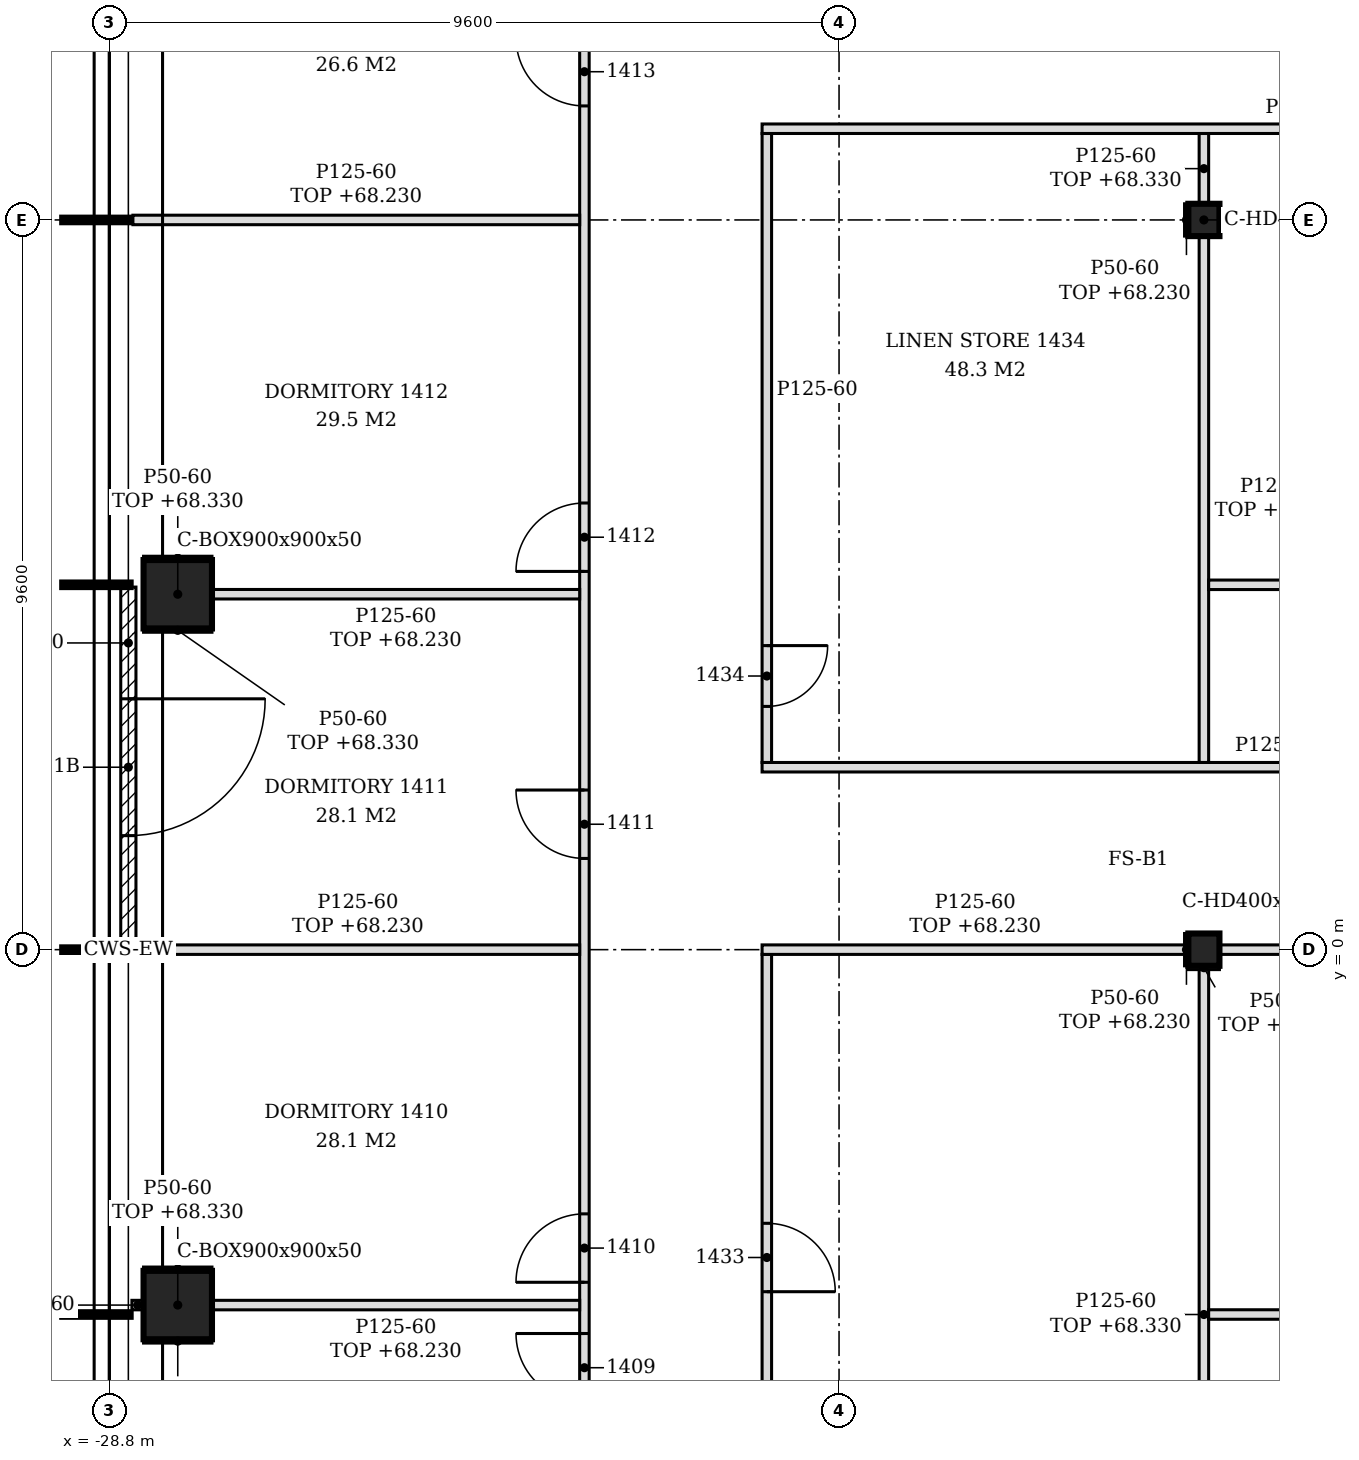
"""IFC4 building model, lengths in metres.
Left out: names, types, materials, properties, quantities, classifications, styles, units other than length and angle.
Written with IfcOpenShell. Run it as: python <this file> out.ifc"""

import sys

from ifc_helpers import new_model, si_unit, direction, frame, frame_2d, origin, origin_2d, place, context, subcontext, project, spatial, polyline, rectangle, hollow_rectangle, i_section, outline, extrude, element, fill, save


model = new_model("IFC4")
c1 = context("Model", 3, precision=1e-05, world=origin(), true_north=direction((0.0, 1.0)))
c2 = subcontext(c1, "Body", "Model", "MODEL_VIEW")
j1 = project(units=[si_unit("LENGTHUNIT", "METRE"), si_unit("PLANEANGLEUNIT", "RADIAN")], contexts=[c1])
p1 = place(None, origin())
s1 = spatial("IfcSite", under=j1, at=p1, CompositionType="ELEMENT")
p2 = place(p1, origin())
s2 = spatial("IfcBuilding", under=s1, at=p2, CompositionType="ELEMENT")
p3 = place(p2, frame((0.0, 0.0, 65.4)))
s3 = spatial("IfcBuildingStorey", under=s2, at=p3, CompositionType="ELEMENT", Elevation=65.4)
for number, where, z_axis, x_axis in (
    (1, (-27.9, 4.676, -0.15), (0.0, 0.0, 1.0), (1.0, 0.0, 0.0)),
    (2, (-27.9, -4.676, -0.15), (0.0, 0.0, 1.0), (1.0, 0.0, 0.0)),
):
    element("IfcColumn", number, at=place(p3, frame(where, z_axis=z_axis, x_axis=x_axis)), inside=s3, PredefinedType="COLUMN", context=c2, shape_type="SweptSolid", body=[
        extrude(hollow_rectangle(XDim=0.9, YDim=0.9, WallThickness=0.05, at=origin_2d()), origin(), (0.0, 0.0, 1.0), 3.6),
    ])
for number, where, z_axis, x_axis in (
    (3, (-14.4, 0.0, -0.15), (0.0, 0.0, 1.0), (1.0, 0.0, 0.0)),
    (4, (-14.4, 9.6, -0.15), (0.0, 0.0, 1.0), (1.0, 0.0, 0.0)),
):
    element("IfcColumn", number, at=place(p3, frame(where, z_axis=z_axis, x_axis=x_axis)), inside=s3, PredefinedType="COLUMN", context=c2, shape_type="SweptSolid", body=[
        extrude(i_section(OverallWidth=0.409, OverallDepth=0.425, WebThickness=0.033, FlangeThickness=0.052, FilletRadius=0.015, at=origin_2d()), origin(), (0.0, 0.0, 1.0), 3.6),
    ])
p4 = place(p3, frame((-28.55, 4.77, 0.0), z_axis=(0.0, 0.0, 1.0), x_axis=(0.0, -1.0, 0.0)))
e5 = element("IfcWall", 5, at=p4, inside=s3, PredefinedType="NOTDEFINED", context=c2, shape_type="SweptSolid", body=[
    extrude(rectangle(XDim=4.74, YDim=0.2, at=frame_2d((2.37, 0.0))), origin(), (0.0, 0.0, 1.0), 3.45),
])
p5 = place(p4, frame((1.47, 0.0, 0.0)))
e6 = element("IfcOpeningElement", 6, at=p5, cuts=e5, PredefinedType="OPENING", context=c2, shape_type="SweptSolid", body=[
    extrude(rectangle(XDim=1.8, YDim=2.4, at=frame_2d((0.9, 1.2))), frame((0.0, 0.11, 0.0), z_axis=(0.0, -1.0, 0.0), x_axis=(1.0, 0.0, 0.0)), (0.0, 0.0, 1.0), 0.22),
])
p6 = place(p3, frame((-22.55, -16.087, 0.0), z_axis=(0.0, 0.0, 1.0), x_axis=(0.0, 1.0, 0.0)))
e7 = element("IfcWall", 7, at=p6, inside=s3, PredefinedType="PARTITIONING", context=c2, shape_type="SweptSolid", body=[
    extrude(outline(polyline([(0.0, 0.0), (36.276, 0.0), (36.276, 3.45), (36.022, 3.45), (36.02, 2.63), (34.907, 2.63), (34.905, 3.45), (30.597, 3.45), (30.595, 2.83), (30.377, 2.83), (30.375, 3.45), (25.798, 3.45), (25.795, 2.83), (25.577, 2.83), (25.575, 3.45), (20.998, 3.45), (20.996, 2.83), (20.778, 2.83), (20.775, 3.45), (16.198, 3.45), (16.196, 2.83), (15.978, 2.83), (15.976, 3.45), (11.397, 3.45), (11.396, 2.83), (11.177, 2.83), (11.176, 3.45), (6.597, 3.45), (6.595, 2.83), (6.377, 2.83), (6.375, 3.45), (1.798, 3.45), (1.795, 2.83), (1.577, 2.83), (1.575, 3.45), (0.0, 3.45), (0.0, 0.0)])), frame((0.0, 0.062, 0.0), z_axis=(0.0, -1.0, 0.0), x_axis=(1.0, 0.0, 0.0)), (0.0, 0.0, 1.0), 0.125),
])
p7 = place(p6, frame((10.137, 0.0, 0.0)))
e8 = element("IfcOpeningElement", 8, at=p7, cuts=e7, PredefinedType="OPENING", context=c2, shape_type="SweptSolid", body=[
    extrude(rectangle(XDim=0.9, YDim=2.1, at=frame_2d((0.45, 1.05))), frame((0.0, 0.073, 0.0), z_axis=(0.0, -1.0, 0.0), x_axis=(1.0, 0.0, 0.0)), (0.0, 0.0, 1.0), 0.145),
])
p8 = place(p6, frame((11.711, 0.0, 0.0)))
e9 = element("IfcOpeningElement", 9, at=p8, cuts=e7, PredefinedType="OPENING", context=c2, shape_type="SweptSolid", body=[
    extrude(rectangle(XDim=0.9, YDim=2.1, at=frame_2d((0.45, 1.05))), frame((0.0, 0.073, 0.0), z_axis=(0.0, -1.0, 0.0), x_axis=(1.0, 0.0, 0.0)), (0.0, 0.0, 1.0), 0.145),
])
p9 = place(p6, frame((17.288, 0.0, 0.0)))
e10 = element("IfcOpeningElement", 10, at=p9, cuts=e7, PredefinedType="OPENING", context=c2, shape_type="SweptSolid", body=[
    extrude(rectangle(XDim=0.9, YDim=2.1, at=frame_2d((0.45, 1.05))), frame((0.0, 0.073, 0.0), z_axis=(0.0, -1.0, 0.0), x_axis=(1.0, 0.0, 0.0)), (0.0, 0.0, 1.0), 0.145),
])
p10 = place(p6, frame((21.063, 0.0, 0.0)))
e11 = element("IfcOpeningElement", 11, at=p10, cuts=e7, PredefinedType="OPENING", context=c2, shape_type="SweptSolid", body=[
    extrude(rectangle(XDim=0.9, YDim=2.1, at=frame_2d((0.45, 1.05))), frame((0.0, 0.073, 0.0), z_axis=(0.0, -1.0, 0.0), x_axis=(1.0, 0.0, 0.0)), (0.0, 0.0, 1.0), 0.145),
])
p11 = place(p6, frame((27.188, 0.0, 0.0)))
e12 = element("IfcOpeningElement", 12, at=p11, cuts=e7, PredefinedType="OPENING", context=c2, shape_type="SweptSolid", body=[
    extrude(rectangle(XDim=0.9, YDim=2.1, at=frame_2d((0.45, 1.05))), frame((0.0, 0.073, 0.0), z_axis=(0.0, -1.0, 0.0), x_axis=(1.0, 0.0, 0.0)), (0.0, 0.0, 1.0), 0.145),
])
p12 = place(p6, frame((30.415, 0.0, 0.0)))
e13 = element("IfcOpeningElement", 13, at=p12, cuts=e7, PredefinedType="OPENING", context=c2, shape_type="SweptSolid", body=[
    extrude(rectangle(XDim=0.9, YDim=2.1, at=frame_2d((0.45, 1.05))), frame((0.0, 0.073, 0.0), z_axis=(0.0, -1.0, 0.0), x_axis=(1.0, 0.0, 0.0)), (0.0, 0.0, 1.0), 0.145),
])
p13 = place(p3, frame((-20.15, -13.688, 0.0), z_axis=(0.0, 0.0, 1.0), x_axis=(0.0, 1.0, 0.0)))
e14 = element("IfcWall", 14, at=p13, inside=s3, PredefinedType="PARTITIONING", context=c2, shape_type="SweptSolid", body=[
    extrude(outline(polyline([(0.0, 0.0), (13.625, 0.0), (13.625, 2.83), (13.577, 2.83), (13.575, 3.45), (8.998, 3.45), (8.996, 2.83), (8.778, 2.83), (8.775, 3.45), (4.198, 3.45), (4.196, 2.83), (3.978, 2.83), (3.976, 3.45), (0.0, 3.45), (0.0, 0.0)])), frame((0.0, 0.062, 0.0), z_axis=(0.0, -1.0, 0.0), x_axis=(1.0, 0.0, 0.0)), (0.0, 0.0, 1.0), 0.125),
])
p14 = place(p13, frame((9.188, 0.0, 0.0)))
e15 = element("IfcOpeningElement", 15, at=p14, cuts=e14, PredefinedType="OPENING", context=c2, shape_type="SweptSolid", body=[
    extrude(rectangle(XDim=0.9, YDim=2.1, at=frame_2d((0.45, 1.05))), frame((0.0, 0.073, 0.0), z_axis=(0.0, -1.0, 0.0), x_axis=(1.0, 0.0, 0.0)), (0.0, 0.0, 1.0), 0.145),
])
p15 = place(p3, frame((-14.4, -9.387, 0.0), z_axis=(0.0, 0.0, 1.0), x_axis=(0.0, 1.0, 0.0)))
e16 = element("IfcWall", 16, at=p15, inside=s3, PredefinedType="PARTITIONING", context=c2, shape_type="SweptSolid", body=[
    extrude(rectangle(XDim=9.175, YDim=0.125, at=frame_2d((4.587, 0.0))), origin(), (0.0, 0.0, 1.0), 2.93),
])
p16 = place(p3, frame((-14.337, -4.8, 0.0), z_axis=(0.0, 0.0, 1.0), x_axis=(1.0, 0.0, 0.0)))
e17 = element("IfcWall", 17, at=p16, inside=s3, PredefinedType="PARTITIONING", context=c2, shape_type="SweptSolid", body=[
    extrude(outline(polyline([(0.0, 0.0), (9.475, 0.0), (9.475, 2.83), (9.387, 2.83), (9.385, 2.93), (0.0, 2.93), (0.0, 0.0)])), frame((0.0, 0.062, 0.0), z_axis=(0.0, -1.0, 0.0), x_axis=(1.0, 0.0, 0.0)), (0.0, 0.0, 1.0), 0.125),
])
p17 = place(p3, frame((-28.503, -4.676, 0.0), z_axis=(0.0, 0.0, 1.0), x_axis=(1.0, 0.0, 0.0)))
e18 = element("IfcWall", 18, at=p17, inside=s3, PredefinedType="PARTITIONING", context=c2, shape_type="SweptSolid", body=[
    extrude(rectangle(XDim=0.153, YDim=0.125, at=frame_2d((0.076, 0.0))), origin(), (0.0, 0.0, 1.0), 3.45),
])
p18 = place(p3, frame((-27.45, -4.676, 0.0), z_axis=(0.0, 0.0, 1.0), x_axis=(1.0, 0.0, 0.0)))
e19 = element("IfcWall", 19, at=p18, inside=s3, PredefinedType="PARTITIONING", context=c2, shape_type="SweptSolid", body=[
    extrude(rectangle(XDim=4.837, YDim=0.125, at=frame_2d((2.419, 0.0))), origin(), (0.0, 0.0, 1.0), 2.83),
])
p19 = place(p3, frame((-28.45, 0.0, 0.0), z_axis=(0.0, 0.0, 1.0), x_axis=(1.0, 0.0, 0.0)))
e20 = element("IfcWall", 20, at=p19, inside=s3, PredefinedType="PARTITIONING", context=c2, shape_type="SweptSolid", body=[
    extrude(rectangle(XDim=5.837, YDim=0.125, at=frame_2d((2.919, 0.0))), origin(), (0.0, 0.0, 1.0), 2.83),
])
p20 = place(p3, frame((-20.212, 0.0, 0.0), z_axis=(0.0, 0.0, 1.0), x_axis=(1.0, 0.0, 0.0)))
e21 = element("IfcWall", 21, at=p20, inside=s3, PredefinedType="PARTITIONING", context=c2, shape_type="SweptSolid", body=[
    extrude(rectangle(XDim=5.608, YDim=0.125, at=frame_2d((2.804, 0.0))), origin(), (0.0, 0.0, 1.0), 2.83),
])
p21 = place(p3, frame((-14.196, 0.0, 0.0), z_axis=(0.0, 0.0, 1.0), x_axis=(1.0, 0.0, 0.0)))
e22 = element("IfcWall", 22, at=p21, inside=s3, PredefinedType="PARTITIONING", context=c2, shape_type="SweptSolid", body=[
    extrude(outline(polyline([(0.0, 0.0), (9.458, 0.0), (9.458, 2.83), (9.246, 2.83), (9.243, 2.93), (0.0, 2.93), (0.0, 0.0)])), frame((0.0, 0.062, 0.0), z_axis=(0.0, -1.0, 0.0), x_axis=(1.0, 0.0, 0.0)), (0.0, 0.0, 1.0), 0.125),
])
p22 = place(p21, frame((8.196, 0.0, 0.0)))
e23 = element("IfcOpeningElement", 23, at=p22, cuts=e22, PredefinedType="OPENING", context=c2, shape_type="SweptSolid", body=[
    extrude(rectangle(XDim=0.9, YDim=2.1, at=frame_2d((0.45, 1.05))), frame((0.0, 0.073, 0.0), z_axis=(0.0, -1.0, 0.0), x_axis=(1.0, 0.0, 0.0)), (0.0, 0.0, 1.0), 0.145),
])
p23 = place(p3, frame((-20.212, 2.4, 0.0), z_axis=(0.0, 0.0, 1.0), x_axis=(1.0, 0.0, 0.0)))
e24 = element("IfcWall", 24, at=p23, inside=s3, PredefinedType="PARTITIONING", context=c2, shape_type="SweptSolid", body=[
    extrude(outline(polyline([(0.0, 0.0), (15.2, 0.0), (15.2, 3.45), (5.962, 3.45), (5.96, 2.93), (5.663, 2.93), (5.66, 3.45), (0.0, 3.45), (0.0, 0.0)])), frame((0.0, 0.062, 0.0), z_axis=(0.0, -1.0, 0.0), x_axis=(1.0, 0.0, 0.0)), (0.0, 0.0, 1.0), 0.125),
])
p24 = place(p23, frame((13.512, 0.0, 0.0)))
e25 = element("IfcOpeningElement", 25, at=p24, cuts=e24, PredefinedType="OPENING", context=c2, shape_type="SweptSolid", body=[
    extrude(rectangle(XDim=0.9, YDim=2.1, at=frame_2d((0.45, 1.05))), frame((0.0, 0.073, 0.0), z_axis=(0.0, -1.0, 0.0), x_axis=(1.0, 0.0, 0.0)), (0.0, 0.0, 1.0), 0.145),
])
p25 = place(p3, frame((-20.15, 2.462, 0.0), z_axis=(0.0, 0.0, 1.0), x_axis=(0.0, 1.0, 0.0)))
e26 = element("IfcWall", 26, at=p25, inside=s3, PredefinedType="PARTITIONING", context=c2, shape_type="SweptSolid", body=[
    extrude(outline(polyline([(0.0, 0.0), (8.275, 0.0), (8.275, 3.45), (7.248, 3.45), (7.246, 2.83), (7.028, 2.83), (7.025, 3.45), (2.448, 3.45), (2.446, 2.83), (2.228, 2.83), (2.226, 3.45), (0.0, 3.45), (0.0, 0.0)])), frame((0.0, 0.062, 0.0), z_axis=(0.0, -1.0, 0.0), x_axis=(1.0, 0.0, 0.0)), (0.0, 0.0, 1.0), 0.125),
])
p26 = place(p25, frame((0.738, 0.0, 0.0)))
e27 = element("IfcOpeningElement", 27, at=p26, cuts=e26, PredefinedType="OPENING", context=c2, shape_type="SweptSolid", body=[
    extrude(rectangle(XDim=0.8, YDim=2.1, at=frame_2d((0.4, 1.05))), frame((0.0, 0.073, 0.0), z_axis=(0.0, -1.0, 0.0), x_axis=(1.0, 0.0, 0.0)), (0.0, 0.0, 1.0), 0.145),
])
p27 = place(p3, frame((-14.4, 2.462, 0.0), z_axis=(0.0, 0.0, 1.0), x_axis=(0.0, 1.0, 0.0)))
e28 = element("IfcWall", 28, at=p27, inside=s3, PredefinedType="PARTITIONING", context=c2, shape_type="SweptSolid", body=[
    extrude(rectangle(XDim=6.925, YDim=0.125, at=frame_2d((3.462, 0.0))), origin(), (0.0, 0.0, 1.0), 2.93),
])
p28 = place(p3, frame((-27.45, 4.676, 0.0), z_axis=(0.0, 0.0, 1.0), x_axis=(1.0, 0.0, 0.0)))
e29 = element("IfcWall", 29, at=p28, inside=s3, PredefinedType="PARTITIONING", context=c2, shape_type="SweptSolid", body=[
    extrude(rectangle(XDim=4.837, YDim=0.125, at=frame_2d((2.419, 0.0))), origin(), (0.0, 0.0, 1.0), 2.83),
])
p29 = place(p3, frame((-14.337, 4.8, 0.0), z_axis=(0.0, 0.0, 1.0), x_axis=(1.0, 0.0, 0.0)))
e30 = element("IfcWall", 30, at=p29, inside=s3, PredefinedType="PARTITIONING", context=c2, shape_type="SweptSolid", body=[
    extrude(outline(polyline([(0.0, 0.0), (9.475, 0.0), (9.475, 2.83), (9.387, 2.83), (9.385, 2.93), (0.0, 2.93), (0.0, 0.0)])), frame((0.0, 0.062, 0.0), z_axis=(0.0, -1.0, 0.0), x_axis=(1.0, 0.0, 0.0)), (0.0, 0.0, 1.0), 0.125),
])
p30 = place(p3, frame((-28.49, 9.6, 0.0), z_axis=(0.0, 0.0, 1.0), x_axis=(1.0, 0.0, 0.0)))
e31 = element("IfcWall", 31, at=p30, inside=s3, PredefinedType="PARTITIONING", context=c2, shape_type="SweptSolid", body=[
    extrude(rectangle(XDim=5.877, YDim=0.125, at=frame_2d((2.939, 0.0))), origin(), (0.0, 0.0, 1.0), 2.83),
])
p31 = place(p3, frame((-14.4, 9.812, 0.0), z_axis=(0.0, 0.0, 1.0), x_axis=(0.0, 1.0, 0.0)))
e32 = element("IfcWall", 32, at=p31, inside=s3, PredefinedType="PARTITIONING", context=c2, shape_type="SweptSolid", body=[
    extrude(rectangle(XDim=0.925, YDim=0.125, at=frame_2d((0.462, 0.0))), origin(), (0.0, 0.0, 1.0), 2.93),
])
p32 = place(p3, frame((-20.212, 10.8, 0.0), z_axis=(0.0, 0.0, 1.0), x_axis=(1.0, 0.0, 0.0)))
e33 = element("IfcWall", 33, at=p32, inside=s3, PredefinedType="PARTITIONING", context=c2, shape_type="SweptSolid", body=[
    extrude(outline(polyline([(0.0, 0.0), (15.475, 0.0), (15.475, 2.83), (15.262, 2.83), (15.26, 3.45), (5.962, 3.45), (5.96, 2.93), (5.663, 2.93), (5.66, 3.45), (0.0, 3.45), (0.0, 0.0)])), frame((0.0, 0.062, 0.0), z_axis=(0.0, -1.0, 0.0), x_axis=(1.0, 0.0, 0.0)), (0.0, 0.0, 1.0), 0.125),
])
p33 = place(p32, frame((14.312, 0.0, 0.0)))
e34 = element("IfcOpeningElement", 34, at=p33, cuts=e33, PredefinedType="OPENING", context=c2, shape_type="SweptSolid", body=[
    extrude(rectangle(XDim=0.8, YDim=2.1, at=frame_2d((0.4, 1.05))), frame((0.0, 0.073, 0.0), z_axis=(0.0, -1.0, 0.0), x_axis=(1.0, 0.0, 0.0)), (0.0, 0.0, 1.0), 0.145),
])
p34 = place(p3, frame((-14.629, -0.212, 0.0), z_axis=(0.0, 0.0, 1.0), x_axis=(0.0, 1.0, 0.0)))
e35 = element("IfcWall", 35, at=p34, inside=s3, PredefinedType="PARTITIONING", context=c2, shape_type="SweptSolid", body=[
    extrude(rectangle(XDim=0.425, YDim=0.05, at=frame_2d((0.212, 0.0))), origin(), (0.0, 0.0, 1.0), 2.83),
])
for number, where, z_axis, x_axis in (
    (36, (-28.35, -4.201, 0.0), (0.0, 0.0, 1.0), (1.0, 0.0, 0.0)),
    (37, (-28.35, -5.151, 0.0), (0.0, 0.0, 1.0), (1.0, 0.0, 0.0)),
):
    element("IfcWall", number, at=place(p3, frame(where, z_axis=z_axis, x_axis=x_axis)), inside=s3, PredefinedType="PARTITIONING", context=c2, shape_type="SweptSolid", body=[
        extrude(rectangle(XDim=0.9, YDim=0.05, at=frame_2d((0.45, 0.0))), origin(), (0.0, 0.0, 1.0), 2.93),
    ])
p35 = place(p3, frame((-14.604, -0.238, 0.0), z_axis=(0.0, 0.0, 1.0), x_axis=(1.0, 0.0, 0.0)))
e38 = element("IfcWall", 38, at=p35, inside=s3, PredefinedType="PARTITIONING", context=c2, shape_type="SweptSolid", body=[
    extrude(rectangle(XDim=0.409, YDim=0.05, at=frame_2d((0.205, 0.0))), origin(), (0.0, 0.0, 1.0), 2.93),
])
p36 = place(p3, frame((-14.629, 9.387, 0.0), z_axis=(0.0, 0.0, 1.0), x_axis=(0.0, 1.0, 0.0)))
e39 = element("IfcWall", 39, at=p36, inside=s3, PredefinedType="PARTITIONING", context=c2, shape_type="SweptSolid", body=[
    extrude(rectangle(XDim=0.425, YDim=0.05, at=frame_2d((0.212, 0.0))), origin(), (0.0, 0.0, 1.0), 2.83),
])
for number, where, z_axis, x_axis in (
    (40, (-28.35, 5.151, 0.0), (0.0, 0.0, 1.0), (1.0, 0.0, 0.0)),
    (41, (-28.35, 4.201, 0.0), (0.0, 0.0, 1.0), (1.0, 0.0, 0.0)),
):
    element("IfcWall", number, at=place(p3, frame(where, z_axis=z_axis, x_axis=x_axis)), inside=s3, PredefinedType="PARTITIONING", context=c2, shape_type="SweptSolid", body=[
        extrude(rectangle(XDim=0.9, YDim=0.05, at=frame_2d((0.45, 0.0))), origin(), (0.0, 0.0, 1.0), 2.93),
    ])
p37 = place(p5, origin())
e42 = element("IfcDoor", 42, at=p37, inside=s3, OperationType="SINGLE_SWING_LEFT", PredefinedType="DOOR", context=c2, shape_type="SweptSolid", body=[
    extrude(rectangle(XDim=1.8, YDim=2.4, at=frame_2d((0.9, 1.2))), frame((0.0, 0.025, 0.0), z_axis=(0.0, -1.0, 0.0), x_axis=(1.0, 0.0, 0.0)), (0.0, 0.0, 1.0), 0.05),
])
fill(e6, e42)
p38 = place(p7, origin())
e43 = element("IfcDoor", 43, at=p38, inside=s3, OperationType="SINGLE_SWING_RIGHT", PredefinedType="DOOR", context=c2, shape_type="SweptSolid", body=[
    extrude(rectangle(XDim=0.9, YDim=2.1, at=frame_2d((0.45, 1.05))), frame((0.0, 0.025, 0.0), z_axis=(0.0, -1.0, 0.0), x_axis=(1.0, 0.0, 0.0)), (0.0, 0.0, 1.0), 0.05),
])
fill(e8, e43)
p39 = place(p8, origin())
e44 = element("IfcDoor", 44, at=p39, inside=s3, OperationType="SINGLE_SWING_LEFT", PredefinedType="DOOR", context=c2, shape_type="SweptSolid", body=[
    extrude(rectangle(XDim=0.9, YDim=2.1, at=frame_2d((0.45, 1.05))), frame((0.0, 0.025, 0.0), z_axis=(0.0, -1.0, 0.0), x_axis=(1.0, 0.0, 0.0)), (0.0, 0.0, 1.0), 0.05),
])
fill(e9, e44)
p40 = place(p9, origin())
e45 = element("IfcDoor", 45, at=p40, inside=s3, OperationType="SINGLE_SWING_RIGHT", PredefinedType="DOOR", context=c2, shape_type="SweptSolid", body=[
    extrude(rectangle(XDim=0.9, YDim=2.1, at=frame_2d((0.45, 1.05))), frame((0.0, 0.025, 0.0), z_axis=(0.0, -1.0, 0.0), x_axis=(1.0, 0.0, 0.0)), (0.0, 0.0, 1.0), 0.05),
])
fill(e10, e45)
p41 = place(p10, origin())
e46 = element("IfcDoor", 46, at=p41, inside=s3, OperationType="SINGLE_SWING_LEFT", PredefinedType="DOOR", context=c2, shape_type="SweptSolid", body=[
    extrude(rectangle(XDim=0.9, YDim=2.1, at=frame_2d((0.45, 1.05))), frame((0.0, 0.025, 0.0), z_axis=(0.0, -1.0, 0.0), x_axis=(1.0, 0.0, 0.0)), (0.0, 0.0, 1.0), 0.05),
])
fill(e11, e46)
p42 = place(p11, origin())
e47 = element("IfcDoor", 47, at=p42, inside=s3, OperationType="SINGLE_SWING_RIGHT", PredefinedType="DOOR", context=c2, shape_type="SweptSolid", body=[
    extrude(rectangle(XDim=0.9, YDim=2.1, at=frame_2d((0.45, 1.05))), frame((0.0, 0.025, 0.0), z_axis=(0.0, -1.0, 0.0), x_axis=(1.0, 0.0, 0.0)), (0.0, 0.0, 1.0), 0.05),
])
fill(e12, e47)
p43 = place(p14, frame((0.9, 0.0, 0.0), z_axis=(0.0, 0.0, 1.0), x_axis=(-1.0, 0.0, 0.0)))
e48 = element("IfcDoor", 48, at=p43, inside=s3, OperationType="SINGLE_SWING_RIGHT", PredefinedType="DOOR", context=c2, shape_type="SweptSolid", body=[
    extrude(rectangle(XDim=0.9, YDim=2.1, at=frame_2d((0.45, 1.05))), frame((0.0, 0.025, 0.0), z_axis=(0.0, -1.0, 0.0), x_axis=(1.0, 0.0, 0.0)), (0.0, 0.0, 1.0), 0.05),
])
fill(e15, e48)
p44 = place(p26, frame((0.8, 0.0, 0.0), z_axis=(0.0, 0.0, 1.0), x_axis=(-1.0, 0.0, 0.0)))
e49 = element("IfcDoor", 49, at=p44, inside=s3, OperationType="SINGLE_SWING_LEFT", PredefinedType="DOOR", context=c2, shape_type="SweptSolid", body=[
    extrude(rectangle(XDim=0.8, YDim=2.1, at=frame_2d((0.4, 1.05))), frame((0.0, 0.025, 0.0), z_axis=(0.0, -1.0, 0.0), x_axis=(1.0, 0.0, 0.0)), (0.0, 0.0, 1.0), 0.05),
])
fill(e27, e49)
save(model, sys.argv[1])
